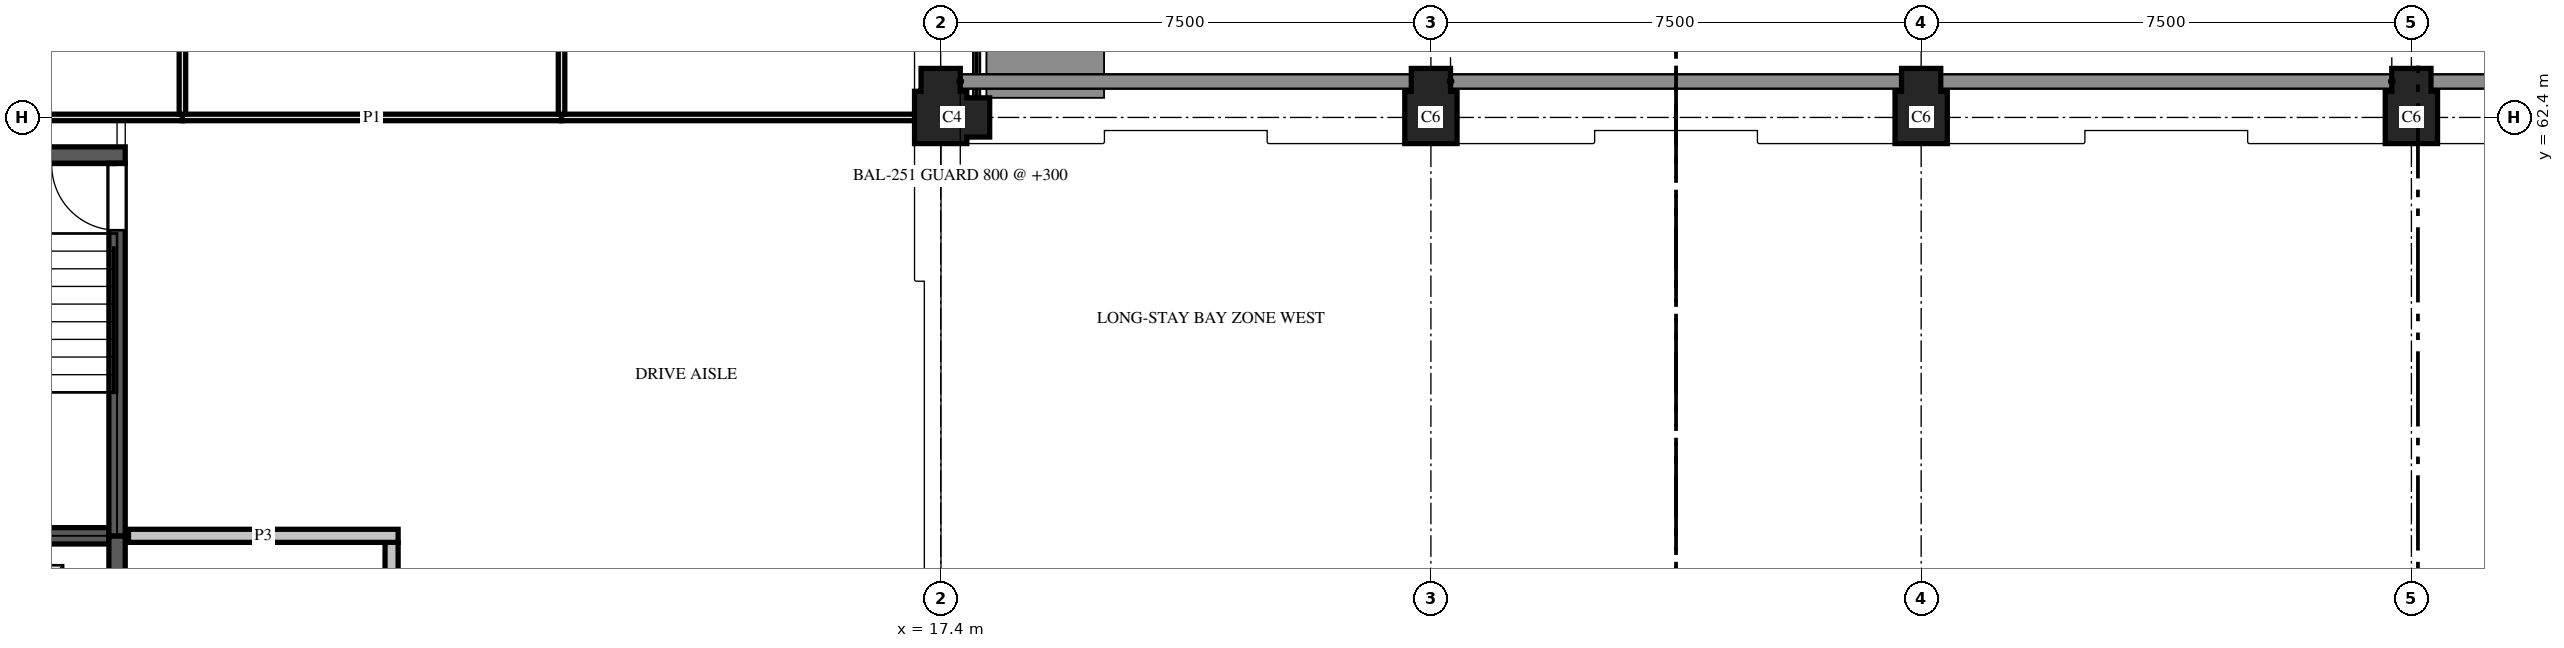
"""IFC4 building model, lengths in metres.
Left out: names, types, materials, properties, quantities, classifications, styles, units other than length and angle.
Written with IfcOpenShell. Run it as: python <this file> out.ifc"""

import sys

from ifc_helpers import new_model, si_unit, direction, frame, frame_2d, origin, place, context, subcontext, project, spatial, polyline, rectangle, outline, extrude, element, fill, save


model = new_model("IFC4")
c1 = context("Model", 3, precision=1e-05, world=origin(), true_north=direction((0.0, 1.0)))
c2 = subcontext(c1, "Body", "Model", "MODEL_VIEW")
j1 = project(units=[si_unit("LENGTHUNIT", "METRE"), si_unit("PLANEANGLEUNIT", "RADIAN")], contexts=[c1])
p1 = place(None, origin())
s1 = spatial("IfcSite", under=j1, at=p1, CompositionType="ELEMENT")
p2 = place(p1, origin())
s2 = spatial("IfcBuilding", under=s1, at=p2, CompositionType="ELEMENT")
p3 = place(p2, frame((0.0, 0.0, 15.6)))
s3 = spatial("IfcBuildingStorey", under=s2, at=p3, CompositionType="ELEMENT", Elevation=15.6)
p4 = place(p3, frame((17.4, 62.4, 0.0), z_axis=(0.0, 0.0, 1.0), x_axis=(1.0, 0.0, 0.0)))
e1 = element("IfcColumn", 1, at=p4, inside=s3, PredefinedType="COLUMN", context=c2, shape_type="SweptSolid", body=[
    extrude(outline(polyline([(-0.4, -0.4), (0.4, -0.4), (0.4, -0.3), (0.75, -0.3), (0.75, 0.3), (0.4, 0.3), (0.4, 0.4), (0.3, 0.4), (0.3, 0.75), (-0.3, 0.75), (-0.3, 0.4), (-0.4, 0.4), (-0.4, -0.4)])), origin(), (0.0, 0.0, 1.0), 3.7),
])
for number, where, z_axis, x_axis in (
    (2, (24.9, 62.4, 0.0), (0.0, 0.0, 1.0), (0.0, 1.0, 0.0)),
    (3, (32.4, 62.4, 0.0), (0.0, 0.0, 1.0), (0.0, 1.0, 0.0)),
    (4, (39.9, 62.4, 0.0), (0.0, 0.0, 1.0), (0.0, 1.0, 0.0)),
):
    element("IfcColumn", number, at=place(p3, frame(where, z_axis=z_axis, x_axis=x_axis)), inside=s3, PredefinedType="COLUMN", context=c2, shape_type="SweptSolid", body=[
        extrude(outline(polyline([(-0.4, -0.4), (0.4, -0.4), (0.4, -0.3), (0.75, -0.3), (0.75, 0.3), (0.4, 0.3), (0.4, 0.4), (-0.4, 0.4), (-0.4, -0.4)])), origin(), (0.0, 0.0, 1.0), 3.7),
    ])
p5 = place(p3, frame((1.65, 56.0, 0.0), z_axis=(0.0, 0.0, 1.0), x_axis=(1.0, 0.0, 0.0)))
e5 = element("IfcWall", 5, at=p5, inside=s3, PredefinedType="SHEAR", context=c2, shape_type="SweptSolid", body=[
    extrude(rectangle(XDim=3.025, YDim=0.25, at=frame_2d((1.513, 0.0))), origin(), (0.0, 0.0, 1.0), 3.7),
])
p6 = place(p3, frame((0.45, 61.825, 0.0), z_axis=(0.0, 0.0, 1.0), x_axis=(1.0, 0.0, 0.0)))
e6 = element("IfcWall", 6, at=p6, inside=s3, PredefinedType="SHEAR", context=c2, shape_type="SweptSolid", body=[
    extrude(rectangle(XDim=4.475, YDim=0.25, at=frame_2d((2.238, 0.0))), origin(), (0.0, 0.0, 1.0), 3.7),
])
p7 = place(p3, frame((4.8, 53.6, 0.0), z_axis=(0.0, 0.0, 1.0), x_axis=(0.0, 1.0, 0.0)))
e7 = element("IfcWall", 7, at=p7, inside=s3, PredefinedType="SHEAR", context=c2, shape_type="SweptSolid", body=[
    extrude(rectangle(XDim=2.4, YDim=0.25, at=frame_2d((1.2, 0.0))), origin(), (0.0, 0.0, 1.0), 3.7),
])
p8 = place(p7, frame((0.65, 0.0, 0.0)))
e8 = element("IfcOpeningElement", 8, at=p8, cuts=e7, PredefinedType="OPENING", context=c2, shape_type="SweptSolid", body=[
    extrude(rectangle(XDim=1.1, YDim=2.1, at=frame_2d((0.55, 1.05))), frame((0.0, 0.135, 0.0), z_axis=(0.0, -1.0, 0.0), x_axis=(1.0, 0.0, 0.0)), (0.0, 0.0, 1.0), 0.27),
])
p9 = place(p3, frame((4.8, 56.0, 0.0), z_axis=(0.0, 0.0, 1.0), x_axis=(0.0, 1.0, 0.0)))
e9 = element("IfcWall", 9, at=p9, inside=s3, PredefinedType="SHEAR", context=c2, shape_type="SweptSolid", body=[
    extrude(rectangle(XDim=5.7, YDim=0.25, at=frame_2d((2.85, 0.0))), origin(), (0.0, 0.0, 1.0), 3.7),
])
p10 = place(p9, frame((4.675, 0.0, 0.0)))
e10 = element("IfcOpeningElement", 10, at=p10, cuts=e9, PredefinedType="OPENING", context=c2, shape_type="SweptSolid", body=[
    extrude(rectangle(XDim=1.0, YDim=2.1, at=frame_2d((0.5, 1.05))), frame((0.0, 0.135, 0.0), z_axis=(0.0, -1.0, 0.0), x_axis=(1.0, 0.0, 0.0)), (0.0, 0.0, 1.0), 0.27),
])
p11 = place(p3, frame((9.0, 51.3, 0.0), z_axis=(0.0, 0.0, 1.0), x_axis=(0.0, 1.0, 0.0)))
e11 = element("IfcWall", 11, at=p11, inside=s3, PredefinedType="PARTITIONING", context=c2, shape_type="SweptSolid", body=[
    extrude(rectangle(XDim=4.6, YDim=0.2, at=frame_2d((2.3, 0.0))), origin(), (0.0, 0.0, 1.0), 2.88),
])
p12 = place(p11, frame((1.8, 0.0, 0.0)))
e12 = element("IfcOpeningElement", 12, at=p12, cuts=e11, PredefinedType="OPENING", context=c2, shape_type="SweptSolid", body=[
    extrude(rectangle(XDim=1.0, YDim=2.1, at=frame_2d((0.5, 1.05))), frame((0.0, 0.11, 0.0), z_axis=(0.0, -1.0, 0.0), x_axis=(1.0, 0.0, 0.0)), (0.0, 0.0, 1.0), 0.22),
])
p13 = place(p3, frame((9.1, 56.0, 0.0), z_axis=(0.0, 0.0, 1.0), x_axis=(-1.0, 0.0, 0.0)))
e13 = element("IfcWall", 13, at=p13, inside=s3, PredefinedType="PARTITIONING", context=c2, shape_type="SweptSolid", body=[
    extrude(rectangle(XDim=4.125, YDim=0.2, at=frame_2d((2.062, 0.0))), origin(), (0.0, 0.0, 1.0), 2.88),
])
p14 = place(p3, frame((0.06, 62.4, 0.0), z_axis=(0.0, 0.0, 1.0), x_axis=(1.0, 0.0, 0.0)))
e14 = element("IfcWall", 14, at=p14, inside=s3, PredefinedType="PARTITIONING", context=c2, shape_type="SweptSolid", body=[
    extrude(rectangle(XDim=5.74, YDim=0.1, at=frame_2d((2.87, 0.0))), origin(), (0.0, 0.0, 1.0), 2.88),
])
p15 = place(p3, frame((5.8, 62.4, 0.0), z_axis=(0.0, 0.0, 1.0), x_axis=(1.0, 0.0, 0.0)))
e15 = element("IfcWall", 15, at=p15, inside=s3, PredefinedType="PARTITIONING", context=c2, shape_type="SweptSolid", body=[
    extrude(rectangle(XDim=5.8, YDim=0.1, at=frame_2d((2.9, 0.0))), origin(), (0.0, 0.0, 1.0), 2.88),
])
p16 = place(p3, frame((5.8, 62.45, 0.0), z_axis=(0.0, 0.0, 1.0), x_axis=(0.0, 1.0, 0.0)))
e16 = element("IfcWall", 16, at=p16, inside=s3, PredefinedType="PARTITIONING", context=c2, shape_type="SweptSolid", body=[
    extrude(rectangle(XDim=22.4, YDim=0.1, at=frame_2d((11.2, 0.0))), origin(), (0.0, 0.0, 1.0), 2.88),
])
p17 = place(p3, frame((11.6, 62.4, 0.0), z_axis=(0.0, 0.0, 1.0), x_axis=(1.0, 0.0, 0.0)))
e17 = element("IfcWall", 17, at=p17, inside=s3, PredefinedType="PARTITIONING", context=c2, shape_type="SweptSolid", body=[
    extrude(rectangle(XDim=5.74, YDim=0.1, at=frame_2d((2.87, 0.0))), origin(), (0.0, 0.0, 1.0), 2.88),
])
p18 = place(p3, frame((11.6, 62.45, 0.0), z_axis=(0.0, 0.0, 1.0), x_axis=(0.0, 1.0, 0.0)))
e18 = element("IfcWall", 18, at=p18, inside=s3, PredefinedType="PARTITIONING", context=c2, shape_type="SweptSolid", body=[
    extrude(rectangle(XDim=22.4, YDim=0.1, at=frame_2d((11.2, 0.0))), origin(), (0.0, 0.0, 1.0), 2.88),
])
p19 = place(p10, origin())
e19 = element("IfcDoor", 19, at=p19, inside=s3, OperationType="SINGLE_SWING_LEFT", PredefinedType="DOOR", context=c2, shape_type="SweptSolid", body=[
    extrude(rectangle(XDim=1.0, YDim=2.1, at=frame_2d((0.5, 1.05))), frame((0.0, 0.025, 0.0), z_axis=(0.0, -1.0, 0.0), x_axis=(1.0, 0.0, 0.0)), (0.0, 0.0, 1.0), 0.05),
])
fill(e10, e19)
save(model, sys.argv[1])
